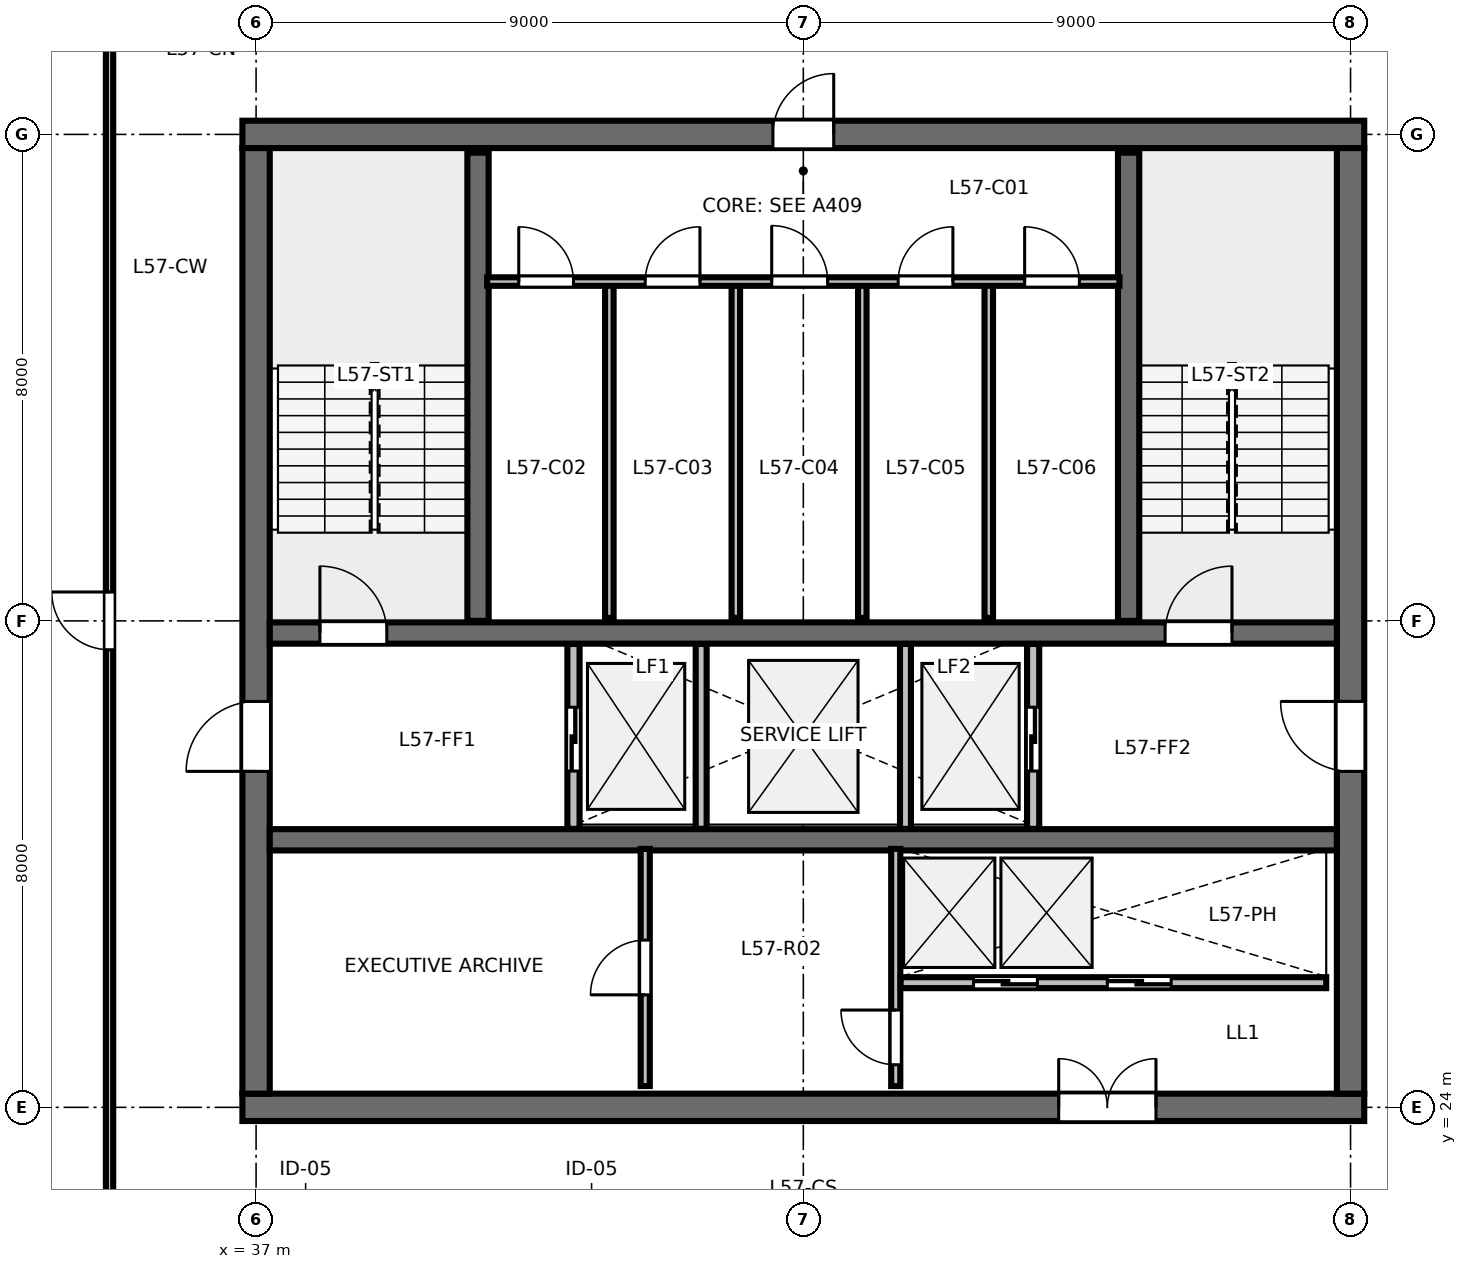
"""IFC4 building model, lengths in metres.
Left out: names, types, materials, properties, quantities, classifications, styles, units other than length and angle.
Written with IfcOpenShell. Run it as: python <this file> out.ifc"""

import sys

from ifc_helpers import new_model, si_unit, direction, frame, frame_2d, origin, place, context, subcontext, project, spatial, rectangle, extrude, element, fill, save


model = new_model("IFC4")
c1 = context("Model", 3, precision=1e-05, world=origin(), true_north=direction((0.0, 1.0)))
c2 = subcontext(c1, "Body", "Model", "MODEL_VIEW")
j1 = project(units=[si_unit("LENGTHUNIT", "METRE"), si_unit("PLANEANGLEUNIT", "RADIAN")], contexts=[c1])
p1 = place(None, origin())
s1 = spatial("IfcSite", under=j1, at=p1, CompositionType="ELEMENT")
p2 = place(p1, origin())
s2 = spatial("IfcBuilding", under=s1, at=p2, CompositionType="ELEMENT")
p3 = place(p2, frame((0.0, 0.0, 216.6)))
s3 = spatial("IfcBuildingStorey", under=s2, at=p3, CompositionType="ELEMENT", Elevation=216.6)
p4 = place(p3, frame((36.775, 24.0, 0.0), z_axis=(0.0, 0.0, 1.0), x_axis=(1.0, 0.0, 0.0)))
e1 = element("IfcWall", 1, at=p4, inside=s3, PredefinedType="SHEAR", context=c2, shape_type="SweptSolid", body=[
    extrude(rectangle(XDim=18.45, YDim=0.45, at=frame_2d((9.225, 0.0))), origin(), (0.0, 0.0, 1.0), 3.36),
])
p5 = place(p4, frame((13.425, 0.0, 0.0)))
e2 = element("IfcOpeningElement", 2, at=p5, cuts=e1, PredefinedType="OPENING", context=c2, shape_type="SweptSolid", body=[
    extrude(rectangle(XDim=1.6, YDim=2.15, at=frame_2d((0.8, 1.075))), frame((0.0, 0.235, 0.0), z_axis=(0.0, -1.0, 0.0), x_axis=(1.0, 0.0, 0.0)), (0.0, 0.0, 1.0), 0.47),
])
p6 = place(p3, frame((36.775, 40.0, 0.0), z_axis=(0.0, 0.0, 1.0), x_axis=(1.0, 0.0, 0.0)))
e3 = element("IfcWall", 3, at=p6, inside=s3, PredefinedType="SHEAR", context=c2, shape_type="SweptSolid", body=[
    extrude(rectangle(XDim=18.45, YDim=0.45, at=frame_2d((9.225, 0.0))), origin(), (0.0, 0.0, 1.0), 3.36),
])
p7 = place(p6, frame((8.725, 0.0, 0.0)))
e4 = element("IfcOpeningElement", 4, at=p7, cuts=e3, PredefinedType="OPENING", context=c2, shape_type="SweptSolid", body=[
    extrude(rectangle(XDim=1.0, YDim=2.15, at=frame_2d((0.5, 1.075))), frame((0.0, 0.235, 0.0), z_axis=(0.0, -1.0, 0.0), x_axis=(1.0, 0.0, 0.0)), (0.0, 0.0, 1.0), 0.47),
])
p8 = place(p3, frame((37.0, 24.225, 0.0), z_axis=(0.0, 0.0, 1.0), x_axis=(0.0, 1.0, 0.0)))
e5 = element("IfcWall", 5, at=p8, inside=s3, PredefinedType="SHEAR", context=c2, shape_type="SweptSolid", body=[
    extrude(rectangle(XDim=15.55, YDim=0.45, at=frame_2d((7.775, 0.0))), origin(), (0.0, 0.0, 1.0), 3.36),
])
p9 = place(p8, frame((5.3, 0.0, 0.0)))
e6 = element("IfcOpeningElement", 6, at=p9, cuts=e5, PredefinedType="OPENING", context=c2, shape_type="SweptSolid", body=[
    extrude(rectangle(XDim=1.15, YDim=2.15, at=frame_2d((0.575, 1.075))), frame((0.0, 0.235, 0.0), z_axis=(0.0, -1.0, 0.0), x_axis=(1.0, 0.0, 0.0)), (0.0, 0.0, 1.0), 0.47),
])
p10 = place(p3, frame((55.0, 24.225, 0.0), z_axis=(0.0, 0.0, 1.0), x_axis=(0.0, 1.0, 0.0)))
e7 = element("IfcWall", 7, at=p10, inside=s3, PredefinedType="SHEAR", context=c2, shape_type="SweptSolid", body=[
    extrude(rectangle(XDim=15.55, YDim=0.45, at=frame_2d((7.775, 0.0))), origin(), (0.0, 0.0, 1.0), 3.36),
])
p11 = place(p10, frame((5.3, 0.0, 0.0)))
e8 = element("IfcOpeningElement", 8, at=p11, cuts=e7, PredefinedType="OPENING", context=c2, shape_type="SweptSolid", body=[
    extrude(rectangle(XDim=1.15, YDim=2.15, at=frame_2d((0.575, 1.075))), frame((0.0, 0.235, 0.0), z_axis=(0.0, -1.0, 0.0), x_axis=(1.0, 0.0, 0.0)), (0.0, 0.0, 1.0), 0.47),
])
p12 = place(p3, frame((37.225, 31.8, 0.0), z_axis=(0.0, 0.0, 1.0), x_axis=(1.0, 0.0, 0.0)))
e9 = element("IfcWall", 9, at=p12, inside=s3, PredefinedType="SHEAR", context=c2, shape_type="SweptSolid", body=[
    extrude(rectangle(XDim=17.55, YDim=0.35, at=frame_2d((8.775, 0.0))), origin(), (0.0, 0.0, 1.0), 3.36),
])
p13 = place(p12, frame((0.825, 0.0, 0.0)))
e10 = element("IfcOpeningElement", 10, at=p13, cuts=e9, PredefinedType="OPENING", context=c2, shape_type="SweptSolid", body=[
    extrude(rectangle(XDim=1.1, YDim=2.15, at=frame_2d((0.55, 1.075))), frame((0.0, 0.185, 0.0), z_axis=(0.0, -1.0, 0.0), x_axis=(1.0, 0.0, 0.0)), (0.0, 0.0, 1.0), 0.37),
])
p14 = place(p12, frame((14.725, 0.0, 0.0)))
e11 = element("IfcOpeningElement", 11, at=p14, cuts=e9, PredefinedType="OPENING", context=c2, shape_type="SweptSolid", body=[
    extrude(rectangle(XDim=1.1, YDim=2.15, at=frame_2d((0.55, 1.075))), frame((0.0, 0.185, 0.0), z_axis=(0.0, -1.0, 0.0), x_axis=(1.0, 0.0, 0.0)), (0.0, 0.0, 1.0), 0.37),
])
p15 = place(p3, frame((37.225, 28.4, 0.0), z_axis=(0.0, 0.0, 1.0), x_axis=(1.0, 0.0, 0.0)))
e12 = element("IfcWall", 12, at=p15, inside=s3, PredefinedType="SHEAR", context=c2, shape_type="SweptSolid", body=[
    extrude(rectangle(XDim=17.55, YDim=0.35, at=frame_2d((8.775, 0.0))), origin(), (0.0, 0.0, 1.0), 3.36),
])
for number, where, z_axis, x_axis in (
    (13, (40.65, 32.0, 0.0), (0.0, 0.0, 1.0), (0.0, 1.0, 0.0)),
    (14, (51.35, 32.0, 0.0), (0.0, 0.0, 1.0), (0.0, 1.0, 0.0)),
):
    element("IfcWall", number, at=place(p3, frame(where, z_axis=z_axis, x_axis=x_axis)), inside=s3, PredefinedType="SHEAR", context=c2, shape_type="SweptSolid", body=[
        extrude(rectangle(XDim=7.7, YDim=0.35, at=frame_2d((3.85, 0.0))), origin(), (0.0, 0.0, 1.0), 3.6),
    ])
for number, where, z_axis, x_axis in (
    (15, (42.81, 32.05, 0.0), (0.0, 0.0, 1.0), (0.0, 1.0, 0.0)),
    (16, (44.89, 32.05, 0.0), (0.0, 0.0, 1.0), (0.0, 1.0, 0.0)),
    (17, (46.97, 32.05, 0.0), (0.0, 0.0, 1.0), (0.0, 1.0, 0.0)),
    (18, (49.05, 32.05, 0.0), (0.0, 0.0, 1.0), (0.0, 1.0, 0.0)),
):
    element("IfcWall", number, at=place(p3, frame(where, z_axis=z_axis, x_axis=x_axis)), inside=s3, PredefinedType="PARTITIONING", context=c2, shape_type="SweptSolid", body=[
        extrude(rectangle(XDim=5.5, YDim=0.14, at=frame_2d((2.75, 0.0))), origin(), (0.0, 0.0, 1.0), 3.375),
    ])
p16 = place(p3, frame((40.8, 37.58, 0.0), z_axis=(0.0, 0.0, 1.0), x_axis=(1.0, 0.0, 0.0)))
e19 = element("IfcWall", 19, at=p16, inside=s3, PredefinedType="PARTITIONING", context=c2, shape_type="SweptSolid", body=[
    extrude(rectangle(XDim=10.4, YDim=0.14, at=frame_2d((5.2, 0.0))), origin(), (0.0, 0.0, 1.0), 3.375),
])
p17 = place(p16, frame((0.52, 0.0, 0.0)))
e20 = element("IfcOpeningElement", 20, at=p17, cuts=e19, PredefinedType="OPENING", context=c2, shape_type="SweptSolid", body=[
    extrude(rectangle(XDim=0.9, YDim=2.15, at=frame_2d((0.45, 1.075))), frame((0.0, 0.08, 0.0), z_axis=(0.0, -1.0, 0.0), x_axis=(1.0, 0.0, 0.0)), (0.0, 0.0, 1.0), 0.16),
])
p18 = place(p16, frame((2.6, 0.0, 0.0)))
e21 = element("IfcOpeningElement", 21, at=p18, cuts=e19, PredefinedType="OPENING", context=c2, shape_type="SweptSolid", body=[
    extrude(rectangle(XDim=0.9, YDim=2.15, at=frame_2d((0.45, 1.075))), frame((0.0, 0.08, 0.0), z_axis=(0.0, -1.0, 0.0), x_axis=(1.0, 0.0, 0.0)), (0.0, 0.0, 1.0), 0.16),
])
p19 = place(p16, frame((4.68, 0.0, 0.0)))
e22 = element("IfcOpeningElement", 22, at=p19, cuts=e19, PredefinedType="OPENING", context=c2, shape_type="SweptSolid", body=[
    extrude(rectangle(XDim=0.92, YDim=2.15, at=frame_2d((0.46, 1.075))), frame((0.0, 0.08, 0.0), z_axis=(0.0, -1.0, 0.0), x_axis=(1.0, 0.0, 0.0)), (0.0, 0.0, 1.0), 0.16),
])
p20 = place(p16, frame((6.76, 0.0, 0.0)))
e23 = element("IfcOpeningElement", 23, at=p20, cuts=e19, PredefinedType="OPENING", context=c2, shape_type="SweptSolid", body=[
    extrude(rectangle(XDim=0.9, YDim=2.15, at=frame_2d((0.45, 1.075))), frame((0.0, 0.08, 0.0), z_axis=(0.0, -1.0, 0.0), x_axis=(1.0, 0.0, 0.0)), (0.0, 0.0, 1.0), 0.16),
])
p21 = place(p16, frame((8.84, 0.0, 0.0)))
e24 = element("IfcOpeningElement", 24, at=p21, cuts=e19, PredefinedType="OPENING", context=c2, shape_type="SweptSolid", body=[
    extrude(rectangle(XDim=0.9, YDim=2.15, at=frame_2d((0.45, 1.075))), frame((0.0, 0.08, 0.0), z_axis=(0.0, -1.0, 0.0), x_axis=(1.0, 0.0, 0.0)), (0.0, 0.0, 1.0), 0.16),
])
p22 = place(p3, frame((42.22, 28.58, 0.0), z_axis=(0.0, 0.0, 1.0), x_axis=(0.0, 1.0, 0.0)))
e25 = element("IfcWall", 25, at=p22, inside=s3, PredefinedType="PARTITIONING", context=c2, shape_type="SweptSolid", body=[
    extrude(rectangle(XDim=3.04, YDim=0.2, at=frame_2d((1.52, 0.0))), origin(), (0.0, 0.0, 1.0), 3.375),
])
p23 = place(p22, frame((0.95, 0.0, 0.0)))
e26 = element("IfcOpeningElement", 26, at=p23, cuts=e25, PredefinedType="OPENING", context=c2, shape_type="SweptSolid", body=[
    extrude(rectangle(XDim=1.05, YDim=2.15, at=frame_2d((0.525, 1.075))), frame((0.0, 0.11, 0.0), z_axis=(0.0, -1.0, 0.0), x_axis=(1.0, 0.0, 0.0)), (0.0, 0.0, 1.0), 0.22),
])
p24 = place(p3, frame((49.78, 28.58, 0.0), z_axis=(0.0, 0.0, 1.0), x_axis=(0.0, 1.0, 0.0)))
e27 = element("IfcWall", 27, at=p24, inside=s3, PredefinedType="PARTITIONING", context=c2, shape_type="SweptSolid", body=[
    extrude(rectangle(XDim=3.04, YDim=0.2, at=frame_2d((1.52, 0.0))), origin(), (0.0, 0.0, 1.0), 3.375),
])
p25 = place(p24, frame((0.95, 0.0, 0.0)))
e28 = element("IfcOpeningElement", 28, at=p25, cuts=e27, PredefinedType="OPENING", context=c2, shape_type="SweptSolid", body=[
    extrude(rectangle(XDim=1.05, YDim=2.15, at=frame_2d((0.525, 1.075))), frame((0.0, 0.11, 0.0), z_axis=(0.0, -1.0, 0.0), x_axis=(1.0, 0.0, 0.0)), (0.0, 0.0, 1.0), 0.22),
])
for number, where, z_axis, x_axis in (
    (29, (44.32, 28.58, 0.0), (0.0, 0.0, 1.0), (0.0, 1.0, 0.0)),
    (30, (47.68, 28.58, 0.0), (0.0, 0.0, 1.0), (0.0, 1.0, 0.0)),
):
    element("IfcWall", number, at=place(p3, frame(where, z_axis=z_axis, x_axis=x_axis)), inside=s3, PredefinedType="PARTITIONING", context=c2, shape_type="SweptSolid", body=[
        extrude(rectangle(XDim=3.04, YDim=0.18, at=frame_2d((1.52, 0.0))), origin(), (0.0, 0.0, 1.0), 3.375),
    ])
p26 = place(p3, frame((43.4, 24.35, 0.0), z_axis=(0.0, 0.0, 1.0), x_axis=(0.0, 1.0, 0.0)))
e31 = element("IfcWall", 31, at=p26, inside=s3, PredefinedType="PARTITIONING", context=c2, shape_type="SweptSolid", body=[
    extrude(rectangle(XDim=3.9, YDim=0.15, at=frame_2d((1.95, 0.0))), origin(), (0.0, 0.0, 1.0), 3.375),
])
p27 = place(p26, frame((1.5, 0.0, 0.0)))
e32 = element("IfcOpeningElement", 32, at=p27, cuts=e31, PredefinedType="OPENING", context=c2, shape_type="SweptSolid", body=[
    extrude(rectangle(XDim=0.9, YDim=2.15, at=frame_2d((0.45, 1.075))), frame((0.0, 0.085, 0.0), z_axis=(0.0, -1.0, 0.0), x_axis=(1.0, 0.0, 0.0)), (0.0, 0.0, 1.0), 0.17),
])
p28 = place(p3, frame((47.52, 24.35, 0.0), z_axis=(0.0, 0.0, 1.0), x_axis=(0.0, 1.0, 0.0)))
e33 = element("IfcWall", 33, at=p28, inside=s3, PredefinedType="PARTITIONING", context=c2, shape_type="SweptSolid", body=[
    extrude(rectangle(XDim=3.9, YDim=0.15, at=frame_2d((1.95, 0.0))), origin(), (0.0, 0.0, 1.0), 3.375),
])
p29 = place(p28, frame((0.35, 0.0, 0.0)))
e34 = element("IfcOpeningElement", 34, at=p29, cuts=e33, PredefinedType="OPENING", context=c2, shape_type="SweptSolid", body=[
    extrude(rectangle(XDim=0.9, YDim=2.15, at=frame_2d((0.45, 1.075))), frame((0.0, 0.085, 0.0), z_axis=(0.0, -1.0, 0.0), x_axis=(1.0, 0.0, 0.0)), (0.0, 0.0, 1.0), 0.17),
])
p30 = place(p3, frame((47.6, 26.05, 0.0), z_axis=(0.0, 0.0, 1.0), x_axis=(1.0, 0.0, 0.0)))
e35 = element("IfcWall", 35, at=p30, inside=s3, PredefinedType="PARTITIONING", context=c2, shape_type="SweptSolid", body=[
    extrude(rectangle(XDim=7.0, YDim=0.18, at=frame_2d((3.5, 0.0))), origin(), (0.0, 0.0, 1.0), 3.375),
])
p31 = place(p30, frame((1.2, 0.0, 0.0)))
e36 = element("IfcOpeningElement", 36, at=p31, cuts=e35, PredefinedType="OPENING", context=c2, shape_type="SweptSolid", body=[
    extrude(rectangle(XDim=1.05, YDim=2.15, at=frame_2d((0.525, 1.075))), frame((0.0, 0.1, 0.0), z_axis=(0.0, -1.0, 0.0), x_axis=(1.0, 0.0, 0.0)), (0.0, 0.0, 1.0), 0.2),
])
p32 = place(p30, frame((3.4, 0.0, 0.0)))
e37 = element("IfcOpeningElement", 37, at=p32, cuts=e35, PredefinedType="OPENING", context=c2, shape_type="SweptSolid", body=[
    extrude(rectangle(XDim=1.05, YDim=2.15, at=frame_2d((0.525, 1.075))), frame((0.0, 0.1, 0.0), z_axis=(0.0, -1.0, 0.0), x_axis=(1.0, 0.0, 0.0)), (0.0, 0.0, 1.0), 0.2),
])
p33 = place(p3, frame((34.59, 21.65, 0.0), z_axis=(0.0, 0.0, 1.0), x_axis=(0.0, 1.0, 0.0)))
e38 = element("IfcWall", 38, at=p33, inside=s3, PredefinedType="PARTITIONING", context=c2, shape_type="SweptSolid", body=[
    extrude(rectangle(XDim=20.7, YDim=0.12, at=frame_2d((10.35, 0.0))), origin(), (0.0, 0.0, 1.0), 2.655),
])
p34 = place(p33, frame((9.875, 0.0, 0.0)))
e39 = element("IfcOpeningElement", 39, at=p34, cuts=e38, PredefinedType="OPENING", context=c2, shape_type="SweptSolid", body=[
    extrude(rectangle(XDim=0.95, YDim=2.15, at=frame_2d((0.475, 1.075))), frame((0.0, 0.07, 0.0), z_axis=(0.0, -1.0, 0.0), x_axis=(1.0, 0.0, 0.0)), (0.0, 0.0, 1.0), 0.14),
])
p35 = place(p13, origin())
e40 = element("IfcDoor", 40, at=p35, inside=s3, OperationType="SINGLE_SWING_LEFT", PredefinedType="DOOR", context=c2, shape_type="SweptSolid", body=[
    extrude(rectangle(XDim=1.1, YDim=2.15, at=frame_2d((0.55, 1.075))), frame((0.0, 0.025, 0.0), z_axis=(0.0, -1.0, 0.0), x_axis=(1.0, 0.0, 0.0)), (0.0, 0.0, 1.0), 0.05),
])
fill(e10, e40)
p36 = place(p14, origin())
e41 = element("IfcDoor", 41, at=p36, inside=s3, OperationType="SINGLE_SWING_RIGHT", PredefinedType="DOOR", context=c2, shape_type="SweptSolid", body=[
    extrude(rectangle(XDim=1.1, YDim=2.15, at=frame_2d((0.55, 1.075))), frame((0.0, 0.025, 0.0), z_axis=(0.0, -1.0, 0.0), x_axis=(1.0, 0.0, 0.0)), (0.0, 0.0, 1.0), 0.05),
])
fill(e11, e41)
p37 = place(p7, origin())
e42 = element("IfcDoor", 42, at=p37, inside=s3, OperationType="SINGLE_SWING_RIGHT", PredefinedType="DOOR", context=c2, shape_type="SweptSolid", body=[
    extrude(rectangle(XDim=1.0, YDim=2.15, at=frame_2d((0.5, 1.075))), frame((0.0, 0.025, 0.0), z_axis=(0.0, -1.0, 0.0), x_axis=(1.0, 0.0, 0.0)), (0.0, 0.0, 1.0), 0.05),
])
fill(e4, e42)
p38 = place(p9, origin())
e43 = element("IfcDoor", 43, at=p38, inside=s3, OperationType="SINGLE_SWING_LEFT", PredefinedType="DOOR", context=c2, shape_type="SweptSolid", body=[
    extrude(rectangle(XDim=1.15, YDim=2.15, at=frame_2d((0.575, 1.075))), frame((0.0, 0.025, 0.0), z_axis=(0.0, -1.0, 0.0), x_axis=(1.0, 0.0, 0.0)), (0.0, 0.0, 1.0), 0.05),
])
fill(e6, e43)
p39 = place(p11, origin())
e44 = element("IfcDoor", 44, at=p39, inside=s3, OperationType="SINGLE_SWING_RIGHT", PredefinedType="DOOR", context=c2, shape_type="SweptSolid", body=[
    extrude(rectangle(XDim=1.15, YDim=2.15, at=frame_2d((0.575, 1.075))), frame((0.0, 0.025, 0.0), z_axis=(0.0, -1.0, 0.0), x_axis=(1.0, 0.0, 0.0)), (0.0, 0.0, 1.0), 0.05),
])
fill(e8, e44)
p40 = place(p5, origin())
e45 = element("IfcDoor", 45, at=p40, inside=s3, OperationType="DOUBLE_DOOR_SINGLE_SWING", PredefinedType="DOOR", context=c2, shape_type="SweptSolid", body=[
    extrude(rectangle(XDim=1.6, YDim=2.15, at=frame_2d((0.8, 1.075))), frame((0.0, 0.025, 0.0), z_axis=(0.0, -1.0, 0.0), x_axis=(1.0, 0.0, 0.0)), (0.0, 0.0, 1.0), 0.05),
])
fill(e2, e45)
p41 = place(p17, origin())
e46 = element("IfcDoor", 46, at=p41, inside=s3, OperationType="SINGLE_SWING_LEFT", PredefinedType="DOOR", context=c2, shape_type="SweptSolid", body=[
    extrude(rectangle(XDim=0.9, YDim=2.15, at=frame_2d((0.45, 1.075))), frame((0.0, 0.025, 0.0), z_axis=(0.0, -1.0, 0.0), x_axis=(1.0, 0.0, 0.0)), (0.0, 0.0, 1.0), 0.05),
])
fill(e20, e46)
p42 = place(p18, origin())
e47 = element("IfcDoor", 47, at=p42, inside=s3, OperationType="SINGLE_SWING_RIGHT", PredefinedType="DOOR", context=c2, shape_type="SweptSolid", body=[
    extrude(rectangle(XDim=0.9, YDim=2.15, at=frame_2d((0.45, 1.075))), frame((0.0, 0.025, 0.0), z_axis=(0.0, -1.0, 0.0), x_axis=(1.0, 0.0, 0.0)), (0.0, 0.0, 1.0), 0.05),
])
fill(e21, e47)
p43 = place(p19, origin())
e48 = element("IfcDoor", 48, at=p43, inside=s3, OperationType="SINGLE_SWING_LEFT", PredefinedType="DOOR", context=c2, shape_type="SweptSolid", body=[
    extrude(rectangle(XDim=0.92, YDim=2.15, at=frame_2d((0.46, 1.075))), frame((0.0, 0.025, 0.0), z_axis=(0.0, -1.0, 0.0), x_axis=(1.0, 0.0, 0.0)), (0.0, 0.0, 1.0), 0.05),
])
fill(e22, e48)
p44 = place(p20, origin())
e49 = element("IfcDoor", 49, at=p44, inside=s3, OperationType="SINGLE_SWING_RIGHT", PredefinedType="DOOR", context=c2, shape_type="SweptSolid", body=[
    extrude(rectangle(XDim=0.9, YDim=2.15, at=frame_2d((0.45, 1.075))), frame((0.0, 0.025, 0.0), z_axis=(0.0, -1.0, 0.0), x_axis=(1.0, 0.0, 0.0)), (0.0, 0.0, 1.0), 0.05),
])
fill(e23, e49)
p45 = place(p21, origin())
e50 = element("IfcDoor", 50, at=p45, inside=s3, OperationType="SINGLE_SWING_LEFT", PredefinedType="DOOR", context=c2, shape_type="SweptSolid", body=[
    extrude(rectangle(XDim=0.9, YDim=2.15, at=frame_2d((0.45, 1.075))), frame((0.0, 0.025, 0.0), z_axis=(0.0, -1.0, 0.0), x_axis=(1.0, 0.0, 0.0)), (0.0, 0.0, 1.0), 0.05),
])
fill(e24, e50)
p46 = place(p23, origin())
e51 = element("IfcDoor", 51, at=p46, inside=s3, OperationType="SLIDING_TO_LEFT", PredefinedType="DOOR", context=c2, shape_type="SweptSolid", body=[
    extrude(rectangle(XDim=1.05, YDim=2.15, at=frame_2d((0.525, 1.075))), frame((0.0, 0.025, 0.0), z_axis=(0.0, -1.0, 0.0), x_axis=(1.0, 0.0, 0.0)), (0.0, 0.0, 1.0), 0.05),
])
fill(e26, e51)
p47 = place(p25, origin())
e52 = element("IfcDoor", 52, at=p47, inside=s3, OperationType="SLIDING_TO_RIGHT", PredefinedType="DOOR", context=c2, shape_type="SweptSolid", body=[
    extrude(rectangle(XDim=1.05, YDim=2.15, at=frame_2d((0.525, 1.075))), frame((0.0, 0.025, 0.0), z_axis=(0.0, -1.0, 0.0), x_axis=(1.0, 0.0, 0.0)), (0.0, 0.0, 1.0), 0.05),
])
fill(e28, e52)
p48 = place(p27, origin())
e53 = element("IfcDoor", 53, at=p48, inside=s3, OperationType="SINGLE_SWING_LEFT", PredefinedType="DOOR", context=c2, shape_type="SweptSolid", body=[
    extrude(rectangle(XDim=0.9, YDim=2.15, at=frame_2d((0.45, 1.075))), frame((0.0, 0.025, 0.0), z_axis=(0.0, -1.0, 0.0), x_axis=(1.0, 0.0, 0.0)), (0.0, 0.0, 1.0), 0.05),
])
fill(e32, e53)
p49 = place(p29, origin())
e54 = element("IfcDoor", 54, at=p49, inside=s3, OperationType="SINGLE_SWING_RIGHT", PredefinedType="DOOR", context=c2, shape_type="SweptSolid", body=[
    extrude(rectangle(XDim=0.9, YDim=2.15, at=frame_2d((0.45, 1.075))), frame((0.0, 0.025, 0.0), z_axis=(0.0, -1.0, 0.0), x_axis=(1.0, 0.0, 0.0)), (0.0, 0.0, 1.0), 0.05),
])
fill(e34, e54)
p50 = place(p31, origin())
e55 = element("IfcDoor", 55, at=p50, inside=s3, OperationType="SLIDING_TO_LEFT", PredefinedType="DOOR", context=c2, shape_type="SweptSolid", body=[
    extrude(rectangle(XDim=1.05, YDim=2.15, at=frame_2d((0.525, 1.075))), frame((0.0, 0.025, 0.0), z_axis=(0.0, -1.0, 0.0), x_axis=(1.0, 0.0, 0.0)), (0.0, 0.0, 1.0), 0.05),
])
fill(e36, e55)
p51 = place(p32, origin())
e56 = element("IfcDoor", 56, at=p51, inside=s3, OperationType="SLIDING_TO_RIGHT", PredefinedType="DOOR", context=c2, shape_type="SweptSolid", body=[
    extrude(rectangle(XDim=1.05, YDim=2.15, at=frame_2d((0.525, 1.075))), frame((0.0, 0.025, 0.0), z_axis=(0.0, -1.0, 0.0), x_axis=(1.0, 0.0, 0.0)), (0.0, 0.0, 1.0), 0.05),
])
fill(e37, e56)
p52 = place(p34, origin())
e57 = element("IfcDoor", 57, at=p52, inside=s3, OperationType="SINGLE_SWING_RIGHT", PredefinedType="DOOR", context=c2, shape_type="SweptSolid", body=[
    extrude(rectangle(XDim=0.95, YDim=2.15, at=frame_2d((0.475, 1.075))), frame((0.0, 0.025, 0.0), z_axis=(0.0, -1.0, 0.0), x_axis=(1.0, 0.0, 0.0)), (0.0, 0.0, 1.0), 0.05),
])
fill(e39, e57)
save(model, sys.argv[1])
